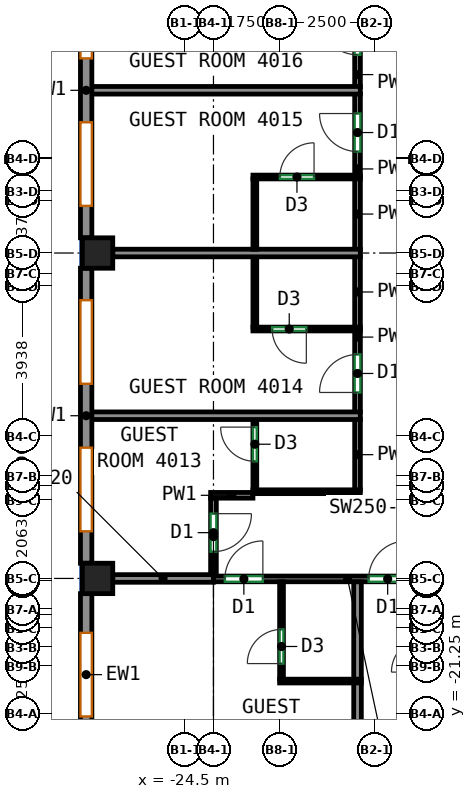
"""IFC4 building model, lengths in metres.
Left out: names, types, materials, properties, quantities, classifications, styles, units other than length and angle.
Written with IfcOpenShell. Run it as: python <this file> out.ifc"""

import sys

from ifc_helpers import new_model, si_unit, direction, frame, frame_2d, origin, origin_2d, place, context, subcontext, project, spatial, rectangle, extrude, source, transform, mapped, element, fill, save


model = new_model("IFC4")
c1 = context("Model", 3, precision=1e-05, world=origin(), true_north=direction((0.0, 1.0)))
c2 = subcontext(c1, "Body", "Model", "MODEL_VIEW")
j1 = project(units=[si_unit("LENGTHUNIT", "METRE"), si_unit("PLANEANGLEUNIT", "RADIAN")], contexts=[c1])
p1 = place(None, origin())
s1 = spatial("IfcSite", under=j1, at=p1, CompositionType="ELEMENT")
p2 = place(p1, origin())
s2 = spatial("IfcBuilding", under=s1, at=p2, CompositionType="ELEMENT")
p3 = place(p2, frame((0.0, 0.0, 171.9)))
s3 = spatial("IfcBuildingStorey", under=s2, at=p3, CompositionType="ELEMENT", Elevation=171.9)
m1 = source(origin(), c2, "Body", "SweptSolid", [
    extrude(rectangle(XDim=0.8, YDim=0.8, at=origin_2d()), origin(), (0.0, 0.0, 1.0), 3.12),
])
for number, where, z_axis, x_axis in (
    (1, (-26.8, -17.688, 0.0), (0.0, 0.0, 1.0), (1.0, 0.0, 0.0)),
    (2, (-26.8, -9.125, 0.0), (0.0, 0.0, 1.0), (1.0, 0.0, 0.0)),
):
    element("IfcColumn", number, at=place(p3, frame(where, z_axis=z_axis, x_axis=x_axis)), inside=s3, PredefinedType="COLUMN", context=c2, shape_type="MappedRepresentation", body=[
        mapped(m1, transform((0.0, 0.0, 0.0))),
    ])
m2 = source(origin(), c2, "Body", "SweptSolid", [
    extrude(rectangle(XDim=7.763, YDim=0.3, at=frame_2d((3.881, 0.0))), origin(), (0.0, 0.0, 1.0), 3.12),
])
p4 = place(p3, frame((-27.1, -0.962, 0.0), z_axis=(0.0, 0.0, 1.0), x_axis=(0.0, -1.0, 0.0)))
e3 = element("IfcWall", 3, at=p4, inside=s3, PredefinedType="SOLIDWALL", context=c2, shape_type="MappedRepresentation", body=[
    mapped(m2, transform((0.0, 0.0, 0.0))),
])
p5 = place(p4, frame((0.841, 0.0, 0.85)))
e4 = element("IfcOpeningElement", 4, at=p5, cuts=e3, PredefinedType="OPENING", context=c2, shape_type="SweptSolid", body=[
    extrude(rectangle(XDim=2.2, YDim=1.95, at=frame_2d((1.1, 0.975))), frame((0.0, 0.16, 0.0), z_axis=(0.0, -1.0, 0.0), x_axis=(1.0, 0.0, 0.0)), (0.0, 0.0, 1.0), 0.32),
])
p6 = place(p4, frame((4.722, 0.0, 0.85)))
e5 = element("IfcOpeningElement", 5, at=p6, cuts=e3, PredefinedType="OPENING", context=c2, shape_type="SweptSolid", body=[
    extrude(rectangle(XDim=2.2, YDim=1.95, at=frame_2d((1.1, 0.975))), frame((0.0, 0.16, 0.0), z_axis=(0.0, -1.0, 0.0), x_axis=(1.0, 0.0, 0.0)), (0.0, 0.0, 1.0), 0.32),
])
p7 = place(p3, frame((-27.1, -9.525, 0.0), z_axis=(0.0, 0.0, 1.0), x_axis=(0.0, -1.0, 0.0)))
e6 = element("IfcWall", 6, at=p7, inside=s3, PredefinedType="SOLIDWALL", context=c2, shape_type="MappedRepresentation", body=[
    mapped(m2, transform((0.0, 0.0, 0.0))),
])
p8 = place(p7, frame((0.841, 0.0, 0.85)))
e7 = element("IfcOpeningElement", 7, at=p8, cuts=e6, PredefinedType="OPENING", context=c2, shape_type="SweptSolid", body=[
    extrude(rectangle(XDim=2.2, YDim=1.95, at=frame_2d((1.1, 0.975))), frame((0.0, 0.16, 0.0), z_axis=(0.0, -1.0, 0.0), x_axis=(1.0, 0.0, 0.0)), (0.0, 0.0, 1.0), 0.32),
])
p9 = place(p7, frame((4.722, 0.0, 0.85)))
e8 = element("IfcOpeningElement", 8, at=p9, cuts=e6, PredefinedType="OPENING", context=c2, shape_type="SweptSolid", body=[
    extrude(rectangle(XDim=2.2, YDim=1.95, at=frame_2d((1.1, 0.975))), frame((0.0, 0.16, 0.0), z_axis=(0.0, -1.0, 0.0), x_axis=(1.0, 0.0, 0.0)), (0.0, 0.0, 1.0), 0.32),
])
m3 = source(origin(), c2, "Body", "SweptSolid", [
    extrude(rectangle(XDim=4.263, YDim=0.3, at=frame_2d((2.131, 0.0))), origin(), (0.0, 0.0, 1.0), 3.12),
])
p10 = place(p3, frame((-27.1, -18.087, 0.0), z_axis=(0.0, 0.0, 1.0), x_axis=(0.0, -1.0, 0.0)))
e9 = element("IfcWall", 9, at=p10, inside=s3, PredefinedType="SOLIDWALL", context=c2, shape_type="MappedRepresentation", body=[
    mapped(m3, transform((0.0, 0.0, 0.0))),
])
p11 = place(p10, frame((1.031, 0.0, 0.85)))
e10 = element("IfcOpeningElement", 10, at=p11, cuts=e9, PredefinedType="OPENING", context=c2, shape_type="SweptSolid", body=[
    extrude(rectangle(XDim=2.2, YDim=1.95, at=frame_2d((1.1, 0.975))), frame((0.0, 0.16, 0.0), z_axis=(0.0, -1.0, 0.0), x_axis=(1.0, 0.0, 0.0)), (0.0, 0.0, 1.0), 0.32),
])
p12 = place(p3, frame((-23.75, -17.7, 0.0), z_axis=(0.0, 0.0, 1.0), x_axis=(1.0, 0.0, 0.0)))
e11 = element("IfcWall", 11, at=p12, inside=s3, PredefinedType="PARTITIONING", context=c2, shape_type="SweptSolid", body=[
    extrude(rectangle(XDim=7.058, YDim=0.15, at=frame_2d((3.529, 0.0))), origin(), (0.0, 0.0, 1.0), 2.52),
])
p13 = place(p12, frame((0.3, 0.0, 0.0)))
e12 = element("IfcOpeningElement", 12, at=p13, cuts=e11, PredefinedType="OPENING", context=c2, shape_type="SweptSolid", body=[
    extrude(rectangle(XDim=1.0, YDim=2.1, at=frame_2d((0.5, 1.05))), frame((0.0, 0.085, 0.0), z_axis=(0.0, -1.0, 0.0), x_axis=(1.0, 0.0, 0.0)), (0.0, 0.0, 1.0), 0.17),
])
p14 = place(p12, frame((4.084, 0.0, 0.0)))
e13 = element("IfcOpeningElement", 13, at=p14, cuts=e11, PredefinedType="OPENING", context=c2, shape_type="SweptSolid", body=[
    extrude(rectangle(XDim=1.0, YDim=2.1, at=frame_2d((0.5, 1.05))), frame((0.0, 0.085, 0.0), z_axis=(0.0, -1.0, 0.0), x_axis=(1.0, 0.0, 0.0)), (0.0, 0.0, 1.0), 0.17),
])
p15 = place(p3, frame((-23.75, -15.575, 0.0), z_axis=(0.0, 0.0, 1.0), x_axis=(0.0, -1.0, 0.0)))
e14 = element("IfcWall", 14, at=p15, inside=s3, PredefinedType="PARTITIONING", context=c2, shape_type="SweptSolid", body=[
    extrude(rectangle(XDim=2.023, YDim=0.15, at=frame_2d((1.011, 0.0))), origin(), (0.0, 0.0, 1.0), 2.52),
])
p16 = place(p15, frame((0.408, 0.0, 0.0)))
e15 = element("IfcOpeningElement", 15, at=p16, cuts=e14, PredefinedType="OPENING", context=c2, shape_type="SweptSolid", body=[
    extrude(rectangle(XDim=1.0, YDim=2.1, at=frame_2d((0.5, 1.05))), frame((0.0, 0.085, 0.0), z_axis=(0.0, -1.0, 0.0), x_axis=(1.0, 0.0, 0.0)), (0.0, 0.0, 1.0), 0.17),
])
p17 = place(p3, frame((-23.825, -15.5, 0.0), z_axis=(0.0, 0.0, 1.0), x_axis=(1.0, 0.0, 0.0)))
e16 = element("IfcWall", 16, at=p17, inside=s3, PredefinedType="PARTITIONING", context=c2, shape_type="SweptSolid", body=[
    extrude(rectangle(XDim=1.114, YDim=0.15, at=frame_2d((0.557, 0.0))), origin(), (0.0, 0.0, 1.0), 3.12),
])
p18 = place(p3, frame((-19.959, -15.366, 0.0), z_axis=(0.0, 0.0, 1.0), x_axis=(0.0, 1.0, 0.0)))
e17 = element("IfcWall", 17, at=p18, inside=s3, PredefinedType="PARTITIONING", context=c2, shape_type="SweptSolid", body=[
    extrude(rectangle(XDim=1.87, YDim=0.15, at=frame_2d((0.935, 0.0))), origin(), (0.0, 0.0, 1.0), 3.12),
])
p19 = place(p3, frame((-19.959, -13.316, 0.0), z_axis=(0.0, 0.0, 1.0), x_axis=(0.0, 1.0, 0.0)))
e18 = element("IfcWall", 18, at=p19, inside=s3, PredefinedType="PARTITIONING", context=c2, shape_type="SweptSolid", body=[
    extrude(rectangle(XDim=2.151, YDim=0.15, at=frame_2d((1.075, 0.0))), origin(), (0.0, 0.0, 1.0), 3.12),
])
p20 = place(p19, frame((0.522, 0.0, 0.0)))
e19 = element("IfcOpeningElement", 19, at=p20, cuts=e18, PredefinedType="OPENING", context=c2, shape_type="SweptSolid", body=[
    extrude(rectangle(XDim=1.0, YDim=2.1, at=frame_2d((0.5, 1.05))), frame((0.0, 0.085, 0.0), z_axis=(0.0, -1.0, 0.0), x_axis=(1.0, 0.0, 0.0)), (0.0, 0.0, 1.0), 0.17),
])
p21 = place(p3, frame((-19.959, -11.085, 0.0), z_axis=(0.0, 0.0, 1.0), x_axis=(0.0, 1.0, 0.0)))
e20 = element("IfcWall", 20, at=p21, inside=s3, PredefinedType="PARTITIONING", context=c2, shape_type="SweptSolid", body=[
    extrude(rectangle(XDim=1.87, YDim=0.15, at=frame_2d((0.935, 0.0))), origin(), (0.0, 0.0, 1.0), 3.12),
])
p22 = place(p3, frame((-19.959, -7.085, 0.0), z_axis=(0.0, 0.0, 1.0), x_axis=(0.0, 1.0, 0.0)))
e21 = element("IfcWall", 21, at=p22, inside=s3, PredefinedType="PARTITIONING", context=c2, shape_type="SweptSolid", body=[
    extrude(rectangle(XDim=2.152, YDim=0.15, at=frame_2d((1.076, 0.0))), origin(), (0.0, 0.0, 1.0), 3.12),
])
p23 = place(p22, frame((0.63, 0.0, 0.0)))
e22 = element("IfcOpeningElement", 22, at=p23, cuts=e21, PredefinedType="OPENING", context=c2, shape_type="SweptSolid", body=[
    extrude(rectangle(XDim=1.0, YDim=2.1, at=frame_2d((0.5, 1.05))), frame((0.0, 0.085, 0.0), z_axis=(0.0, -1.0, 0.0), x_axis=(1.0, 0.0, 0.0)), (0.0, 0.0, 1.0), 0.17),
])
p24 = place(p3, frame((-19.959, -9.035, 0.0), z_axis=(0.0, 0.0, 1.0), x_axis=(0.0, 1.0, 0.0)))
e23 = element("IfcWall", 23, at=p24, inside=s3, PredefinedType="PARTITIONING", context=c2, shape_type="SweptSolid", body=[
    extrude(rectangle(XDim=1.87, YDim=0.15, at=frame_2d((0.935, 0.0))), origin(), (0.0, 0.0, 1.0), 3.12),
])
p25 = place(p3, frame((-19.959, -4.753, 0.0), z_axis=(0.0, 0.0, 1.0), x_axis=(0.0, 1.0, 0.0)))
e24 = element("IfcWall", 24, at=p25, inside=s3, PredefinedType="PARTITIONING", context=c2, shape_type="SweptSolid", body=[
    extrude(rectangle(XDim=2.151, YDim=0.15, at=frame_2d((1.075, 0.0))), origin(), (0.0, 0.0, 1.0), 3.12),
])
p26 = place(p25, frame((0.844, 0.0, 0.0)))
e25 = element("IfcOpeningElement", 25, at=p26, cuts=e24, PredefinedType="OPENING", context=c2, shape_type="SweptSolid", body=[
    extrude(rectangle(XDim=1.0, YDim=2.1, at=frame_2d((0.5, 1.05))), frame((0.0, 0.085, 0.0), z_axis=(0.0, -1.0, 0.0), x_axis=(1.0, 0.0, 0.0)), (0.0, 0.0, 1.0), 0.17),
])
p27 = place(p3, frame((-21.959, -20.338, 0.0), z_axis=(0.0, 0.0, 1.0), x_axis=(0.0, 1.0, 0.0)))
e26 = element("IfcWall", 26, at=p27, inside=s3, PredefinedType="PARTITIONING", context=c2, shape_type="SweptSolid", body=[
    extrude(rectangle(XDim=2.561, YDim=0.1, at=frame_2d((1.28, 0.0))), origin(), (0.0, 0.0, 1.0), 3.12),
])
p28 = place(p27, frame((0.41, 0.0, 0.0)))
e27 = element("IfcOpeningElement", 27, at=p28, cuts=e26, PredefinedType="OPENING", context=c2, shape_type="SweptSolid", body=[
    extrude(rectangle(XDim=0.9, YDim=2.1, at=frame_2d((0.45, 1.05))), frame((0.0, 0.06, 0.0), z_axis=(0.0, -1.0, 0.0), x_axis=(1.0, 0.0, 0.0)), (0.0, 0.0, 1.0), 0.12),
])
p29 = place(p3, frame((-22.009, -20.388, 0.0), z_axis=(0.0, 0.0, 1.0), x_axis=(1.0, 0.0, 0.0)))
e28 = element("IfcWall", 28, at=p29, inside=s3, PredefinedType="PARTITIONING", context=c2, shape_type="SweptSolid", body=[
    extrude(rectangle(XDim=2.15, YDim=0.1, at=frame_2d((1.075, 0.0))), origin(), (0.0, 0.0, 1.0), 3.12),
])
p30 = place(p3, frame((-19.959, -26.0, 0.0), z_axis=(0.0, 0.0, 1.0), x_axis=(0.0, 1.0, 0.0)))
e29 = element("IfcWall", 29, at=p30, inside=s3, PredefinedType="PARTITIONING", context=c2, shape_type="SweptSolid", body=[
    extrude(rectangle(XDim=5.562, YDim=0.2, at=frame_2d((2.781, 0.0))), origin(), (0.0, 0.0, 1.0), 3.12),
])
p31 = place(p3, frame((-26.4, -17.688, 0.0), z_axis=(0.0, 0.0, 1.0), x_axis=(1.0, 0.0, 0.0)))
e30 = element("IfcWall", 30, at=p31, inside=s3, PredefinedType="PARTITIONING", context=c2, shape_type="SweptSolid", body=[
    extrude(rectangle(XDim=2.648, YDim=0.2, at=frame_2d((1.324, 0.0))), origin(), (0.0, 0.0, 1.0), 2.52),
])
p32 = place(p3, frame((-19.959, -20.338, 0.0), z_axis=(0.0, 0.0, 1.0), x_axis=(0.0, 1.0, 0.0)))
e31 = element("IfcWall", 31, at=p32, inside=s3, PredefinedType="PARTITIONING", context=c2, shape_type="SweptSolid", body=[
    extrude(rectangle(XDim=2.561, YDim=0.2, at=frame_2d((1.28, 0.0))), origin(), (0.0, 0.0, 1.0), 3.12),
])
p33 = place(p3, frame((-19.886, -15.406, 0.0), z_axis=(0.0, 0.0, 1.0), x_axis=(-1.0, 0.0, 0.0)))
e32 = element("IfcWall", 32, at=p33, inside=s3, PredefinedType="PARTITIONING", context=c2, shape_type="SweptSolid", body=[
    extrude(rectangle(XDim=2.825, YDim=0.1, at=frame_2d((1.413, 0.0))), origin(), (0.0, 0.0, 1.0), 3.12),
])
p34 = place(p3, frame((-22.661, -15.356, 0.0), z_axis=(0.0, 0.0, 1.0), x_axis=(0.0, 1.0, 0.0)))
e33 = element("IfcWall", 33, at=p34, inside=s3, PredefinedType="PARTITIONING", context=c2, shape_type="SweptSolid", body=[
    extrude(rectangle(XDim=1.85, YDim=0.1, at=frame_2d((0.925, 0.0))), origin(), (0.0, 0.0, 1.0), 3.12),
])
p35 = place(p34, frame((0.75, 0.0, 0.0)))
e34 = element("IfcOpeningElement", 34, at=p35, cuts=e33, PredefinedType="OPENING", context=c2, shape_type="SweptSolid", body=[
    extrude(rectangle(XDim=0.9, YDim=2.1, at=frame_2d((0.45, 1.05))), frame((0.0, 0.06, 0.0), z_axis=(0.0, -1.0, 0.0), x_axis=(1.0, 0.0, 0.0)), (0.0, 0.0, 1.0), 0.12),
])
p36 = place(p3, frame((-27.0, -13.406, 0.0), z_axis=(0.0, 0.0, 1.0), x_axis=(1.0, 0.0, 0.0)))
e35 = element("IfcWall", 35, at=p36, inside=s3, PredefinedType="PARTITIONING", context=c2, shape_type="SweptSolid", body=[
    extrude(rectangle(XDim=7.114, YDim=0.2, at=frame_2d((3.557, 0.0))), origin(), (0.0, 0.0, 1.0), 3.12),
])
p37 = place(p3, frame((-19.886, -11.125, 0.0), z_axis=(0.0, 0.0, 1.0), x_axis=(-1.0, 0.0, 0.0)))
e36 = element("IfcWall", 36, at=p37, inside=s3, PredefinedType="PARTITIONING", context=c2, shape_type="SweptSolid", body=[
    extrude(rectangle(XDim=2.825, YDim=0.1, at=frame_2d((1.413, 0.0))), origin(), (0.0, 0.0, 1.0), 3.12),
])
p38 = place(p37, frame((1.42, 0.0, 0.0)))
e37 = element("IfcOpeningElement", 37, at=p38, cuts=e36, PredefinedType="OPENING", context=c2, shape_type="SweptSolid", body=[
    extrude(rectangle(XDim=0.9, YDim=2.1, at=frame_2d((0.45, 1.05))), frame((0.0, 0.06, 0.0), z_axis=(0.0, -1.0, 0.0), x_axis=(1.0, 0.0, 0.0)), (0.0, 0.0, 1.0), 0.12),
])
p39 = place(p3, frame((-22.661, -11.075, 0.0), z_axis=(0.0, 0.0, 1.0), x_axis=(0.0, 1.0, 0.0)))
e38 = element("IfcWall", 38, at=p39, inside=s3, PredefinedType="PARTITIONING", context=c2, shape_type="SweptSolid", body=[
    extrude(rectangle(XDim=1.85, YDim=0.1, at=frame_2d((0.925, 0.0))), origin(), (0.0, 0.0, 1.0), 3.12),
])
p40 = place(p3, frame((-26.4, -9.125, 0.0), z_axis=(0.0, 0.0, 1.0), x_axis=(1.0, 0.0, 0.0)))
e39 = element("IfcWall", 39, at=p40, inside=s3, PredefinedType="PARTITIONING", context=c2, shape_type="SweptSolid", body=[
    extrude(rectangle(XDim=6.514, YDim=0.2, at=frame_2d((3.257, 0.0))), origin(), (0.0, 0.0, 1.0), 3.12),
])
p41 = place(p3, frame((-22.711, -7.125, 0.0), z_axis=(0.0, 0.0, 1.0), x_axis=(1.0, 0.0, 0.0)))
e40 = element("IfcWall", 40, at=p41, inside=s3, PredefinedType="PARTITIONING", context=c2, shape_type="SweptSolid", body=[
    extrude(rectangle(XDim=2.825, YDim=0.1, at=frame_2d((1.413, 0.0))), origin(), (0.0, 0.0, 1.0), 3.12),
])
p42 = place(p41, frame((0.708, 0.0, 0.0)))
e41 = element("IfcOpeningElement", 41, at=p42, cuts=e40, PredefinedType="OPENING", context=c2, shape_type="SweptSolid", body=[
    extrude(rectangle(XDim=0.9, YDim=2.1, at=frame_2d((0.45, 1.05))), frame((0.0, 0.06, 0.0), z_axis=(0.0, -1.0, 0.0), x_axis=(1.0, 0.0, 0.0)), (0.0, 0.0, 1.0), 0.12),
])
p43 = place(p3, frame((-22.661, -9.025, 0.0), z_axis=(0.0, 0.0, 1.0), x_axis=(0.0, 1.0, 0.0)))
e42 = element("IfcWall", 42, at=p43, inside=s3, PredefinedType="PARTITIONING", context=c2, shape_type="SweptSolid", body=[
    extrude(rectangle(XDim=1.85, YDim=0.1, at=frame_2d((0.925, 0.0))), origin(), (0.0, 0.0, 1.0), 3.12),
])
p44 = place(p3, frame((-27.0, -4.843, 0.0), z_axis=(0.0, 0.0, 1.0), x_axis=(1.0, 0.0, 0.0)))
e43 = element("IfcWall", 43, at=p44, inside=s3, PredefinedType="PARTITIONING", context=c2, shape_type="SweptSolid", body=[
    extrude(rectangle(XDim=7.114, YDim=0.2, at=frame_2d((3.557, 0.0))), origin(), (0.0, 0.0, 1.0), 3.12),
])
p45 = place(p5, origin())
e44 = element("IfcWindow", 44, at=p45, inside=s3, PartitioningType="SINGLE_PANEL", PredefinedType="WINDOW", context=c2, shape_type="SweptSolid", body=[
    extrude(rectangle(XDim=2.2, YDim=1.95, at=frame_2d((1.1, 0.975))), frame((0.0, 0.03, 0.0), z_axis=(0.0, -1.0, 0.0), x_axis=(1.0, 0.0, 0.0)), (0.0, 0.0, 1.0), 0.06),
])
fill(e4, e44)
p46 = place(p6, origin())
e45 = element("IfcWindow", 45, at=p46, inside=s3, PartitioningType="SINGLE_PANEL", PredefinedType="WINDOW", context=c2, shape_type="SweptSolid", body=[
    extrude(rectangle(XDim=2.2, YDim=1.95, at=frame_2d((1.1, 0.975))), frame((0.0, 0.03, 0.0), z_axis=(0.0, -1.0, 0.0), x_axis=(1.0, 0.0, 0.0)), (0.0, 0.0, 1.0), 0.06),
])
fill(e5, e45)
p47 = place(p8, origin())
e46 = element("IfcWindow", 46, at=p47, inside=s3, PartitioningType="SINGLE_PANEL", PredefinedType="WINDOW", context=c2, shape_type="SweptSolid", body=[
    extrude(rectangle(XDim=2.2, YDim=1.95, at=frame_2d((1.1, 0.975))), frame((0.0, 0.03, 0.0), z_axis=(0.0, -1.0, 0.0), x_axis=(1.0, 0.0, 0.0)), (0.0, 0.0, 1.0), 0.06),
])
fill(e7, e46)
p48 = place(p9, origin())
e47 = element("IfcWindow", 47, at=p48, inside=s3, PartitioningType="SINGLE_PANEL", PredefinedType="WINDOW", context=c2, shape_type="SweptSolid", body=[
    extrude(rectangle(XDim=2.2, YDim=1.95, at=frame_2d((1.1, 0.975))), frame((0.0, 0.03, 0.0), z_axis=(0.0, -1.0, 0.0), x_axis=(1.0, 0.0, 0.0)), (0.0, 0.0, 1.0), 0.06),
])
fill(e8, e47)
p49 = place(p11, origin())
e48 = element("IfcWindow", 48, at=p49, inside=s3, PartitioningType="SINGLE_PANEL", PredefinedType="WINDOW", context=c2, shape_type="SweptSolid", body=[
    extrude(rectangle(XDim=2.2, YDim=1.95, at=frame_2d((1.1, 0.975))), frame((0.0, 0.03, 0.0), z_axis=(0.0, -1.0, 0.0), x_axis=(1.0, 0.0, 0.0)), (0.0, 0.0, 1.0), 0.06),
])
fill(e10, e48)
p50 = place(p28, origin())
e49 = element("IfcDoor", 49, at=p50, inside=s3, OperationType="SINGLE_SWING_LEFT", PredefinedType="DOOR", context=c2, shape_type="SweptSolid", body=[
    extrude(rectangle(XDim=0.9, YDim=2.1, at=frame_2d((0.45, 1.05))), frame((0.0, 0.025, 0.0), z_axis=(0.0, -1.0, 0.0), x_axis=(1.0, 0.0, 0.0)), (0.0, 0.0, 1.0), 0.05),
])
fill(e27, e49)
p51 = place(p13, origin())
e50 = element("IfcDoor", 50, at=p51, inside=s3, OperationType="SINGLE_SWING_RIGHT", PredefinedType="DOOR", context=c2, shape_type="SweptSolid", body=[
    extrude(rectangle(XDim=1.0, YDim=2.1, at=frame_2d((0.5, 1.05))), frame((0.0, 0.025, 0.0), z_axis=(0.0, -1.0, 0.0), x_axis=(1.0, 0.0, 0.0)), (0.0, 0.0, 1.0), 0.05),
])
fill(e12, e50)
p52 = place(p14, origin())
e51 = element("IfcDoor", 51, at=p52, inside=s3, OperationType="SINGLE_SWING_RIGHT", PredefinedType="DOOR", context=c2, shape_type="SweptSolid", body=[
    extrude(rectangle(XDim=1.0, YDim=2.1, at=frame_2d((0.5, 1.05))), frame((0.0, 0.025, 0.0), z_axis=(0.0, -1.0, 0.0), x_axis=(1.0, 0.0, 0.0)), (0.0, 0.0, 1.0), 0.05),
])
fill(e13, e51)
p53 = place(p16, origin())
e52 = element("IfcDoor", 52, at=p53, inside=s3, OperationType="SINGLE_SWING_LEFT", PredefinedType="DOOR", context=c2, shape_type="SweptSolid", body=[
    extrude(rectangle(XDim=1.0, YDim=2.1, at=frame_2d((0.5, 1.05))), frame((0.0, 0.025, 0.0), z_axis=(0.0, -1.0, 0.0), x_axis=(1.0, 0.0, 0.0)), (0.0, 0.0, 1.0), 0.05),
])
fill(e15, e52)
p54 = place(p35, origin())
e53 = element("IfcDoor", 53, at=p54, inside=s3, OperationType="SINGLE_SWING_RIGHT", PredefinedType="DOOR", context=c2, shape_type="SweptSolid", body=[
    extrude(rectangle(XDim=0.9, YDim=2.1, at=frame_2d((0.45, 1.05))), frame((0.0, 0.025, 0.0), z_axis=(0.0, -1.0, 0.0), x_axis=(1.0, 0.0, 0.0)), (0.0, 0.0, 1.0), 0.05),
])
fill(e34, e53)
p55 = place(p20, origin())
e54 = element("IfcDoor", 54, at=p55, inside=s3, OperationType="SINGLE_SWING_LEFT", PredefinedType="DOOR", context=c2, shape_type="SweptSolid", body=[
    extrude(rectangle(XDim=1.0, YDim=2.1, at=frame_2d((0.5, 1.05))), frame((0.0, 0.025, 0.0), z_axis=(0.0, -1.0, 0.0), x_axis=(1.0, 0.0, 0.0)), (0.0, 0.0, 1.0), 0.05),
])
fill(e19, e54)
p56 = place(p38, origin())
e55 = element("IfcDoor", 55, at=p56, inside=s3, OperationType="SINGLE_SWING_LEFT", PredefinedType="DOOR", context=c2, shape_type="SweptSolid", body=[
    extrude(rectangle(XDim=0.9, YDim=2.1, at=frame_2d((0.45, 1.05))), frame((0.0, 0.025, 0.0), z_axis=(0.0, -1.0, 0.0), x_axis=(1.0, 0.0, 0.0)), (0.0, 0.0, 1.0), 0.05),
])
fill(e37, e55)
p57 = place(p42, origin())
e56 = element("IfcDoor", 56, at=p57, inside=s3, OperationType="SINGLE_SWING_RIGHT", PredefinedType="DOOR", context=c2, shape_type="SweptSolid", body=[
    extrude(rectangle(XDim=0.9, YDim=2.1, at=frame_2d((0.45, 1.05))), frame((0.0, 0.025, 0.0), z_axis=(0.0, -1.0, 0.0), x_axis=(1.0, 0.0, 0.0)), (0.0, 0.0, 1.0), 0.05),
])
fill(e41, e56)
p58 = place(p23, origin())
e57 = element("IfcDoor", 57, at=p58, inside=s3, OperationType="SINGLE_SWING_RIGHT", PredefinedType="DOOR", context=c2, shape_type="SweptSolid", body=[
    extrude(rectangle(XDim=1.0, YDim=2.1, at=frame_2d((0.5, 1.05))), frame((0.0, 0.025, 0.0), z_axis=(0.0, -1.0, 0.0), x_axis=(1.0, 0.0, 0.0)), (0.0, 0.0, 1.0), 0.05),
])
fill(e22, e57)
p59 = place(p26, origin())
e58 = element("IfcDoor", 58, at=p59, inside=s3, OperationType="SINGLE_SWING_RIGHT", PredefinedType="DOOR", context=c2, shape_type="SweptSolid", body=[
    extrude(rectangle(XDim=1.0, YDim=2.1, at=frame_2d((0.5, 1.05))), frame((0.0, 0.025, 0.0), z_axis=(0.0, -1.0, 0.0), x_axis=(1.0, 0.0, 0.0)), (0.0, 0.0, 1.0), 0.05),
])
fill(e25, e58)
save(model, sys.argv[1])
